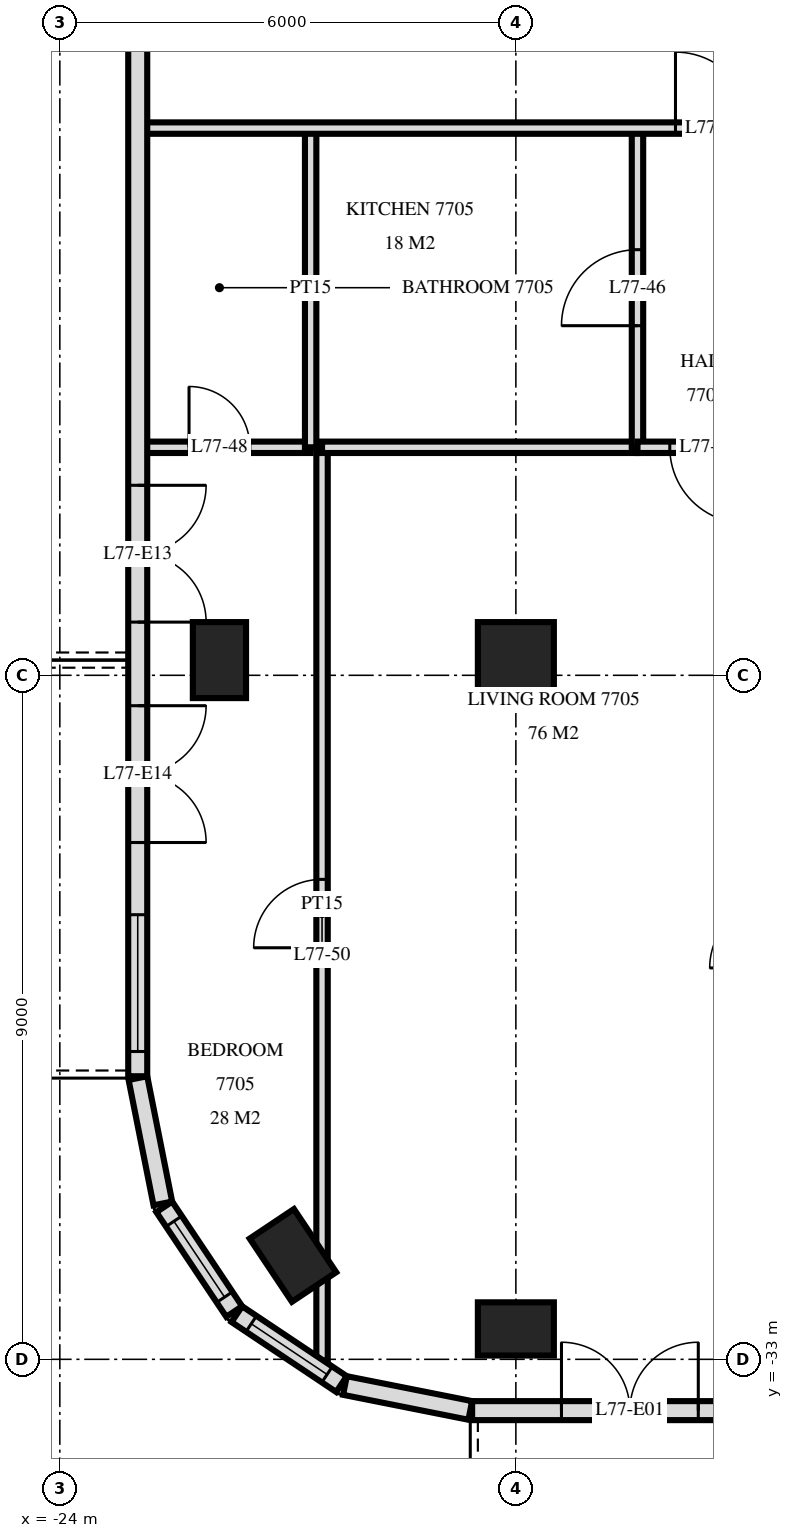
"""IFC4 building model, lengths in metres.
Left out: names, types, materials, properties, quantities, classifications, styles, units other than length and angle.
Written with IfcOpenShell. Run it as: python <this file> out.ifc"""

import sys

from ifc_helpers import new_model, si_unit, direction, frame, frame_2d, origin, origin_2d, place, context, subcontext, project, spatial, rectangle, extrude, element, fill, save


model = new_model("IFC4")
c1 = context("Model", 3, precision=1e-05, world=origin(), true_north=direction((0.0, 1.0)))
c2 = subcontext(c1, "Body", "Model", "MODEL_VIEW")
j1 = project(units=[si_unit("LENGTHUNIT", "METRE"), si_unit("PLANEANGLEUNIT", "RADIAN")], contexts=[c1])
p1 = place(None, origin())
s1 = spatial("IfcSite", under=j1, at=p1, CompositionType="ELEMENT")
p2 = place(p1, origin())
s2 = spatial("IfcBuilding", under=s1, at=p2, CompositionType="ELEMENT")
p3 = place(p2, frame((0.0, 0.0, 291.1)))
s3 = spatial("IfcBuildingStorey", under=s2, at=p3, CompositionType="ELEMENT", Elevation=291.1)
for number, where, z_axis, x_axis in (
    (1, (-21.9, -23.8, 0.0), (0.0, 0.0, 1.0), (0.0, 1.0, 0.0)),
    (2, (-20.933, -31.633, 0.0), (0.0, 0.0, 1.0), (-0.556, 0.831, 0.0)),
    (3, (-18.0, -32.6, 0.0), (0.0, 0.0, 1.0), (1.0, 0.0, 0.0)),
):
    element("IfcColumn", number, at=place(p3, frame(where, z_axis=z_axis, x_axis=x_axis)), inside=s3, PredefinedType="COLUMN", context=c2, shape_type="SweptSolid", body=[
        extrude(rectangle(XDim=1.0, YDim=0.7, at=origin_2d()), origin(), (0.0, 0.0, 1.0), 3.5),
    ])
p4 = place(p3, frame((-18.0, -23.8, 0.0), z_axis=(0.0, 0.0, 1.0), x_axis=(1.0, 0.0, 0.0)))
e4 = element("IfcColumn", 4, at=p4, inside=s3, PredefinedType="COLUMN", context=c2, shape_type="SweptSolid", body=[
    extrude(rectangle(XDim=1.0, YDim=1.0, at=origin_2d()), origin(), (0.0, 0.0, 1.0), 3.5),
])
p5 = place(p3, frame((-22.975, -3.325, 0.0), z_axis=(0.0, 0.0, 1.0), x_axis=(0.0, -1.0, 0.0)))
e5 = element("IfcWall", 5, at=p5, inside=s3, PredefinedType="SOLIDWALL", context=c2, shape_type="SweptSolid", body=[
    extrude(rectangle(XDim=25.951, YDim=0.25, at=frame_2d((12.975, 0.0))), origin(), (0.0, 0.0, 1.0), 3.22),
])
p6 = place(p5, frame((1.475, 0.0, 0.0)))
e6 = element("IfcOpeningElement", 6, at=p6, cuts=e5, PredefinedType="OPENING", context=c2, shape_type="SweptSolid", body=[
    extrude(rectangle(XDim=1.8, YDim=2.4, at=frame_2d((0.9, 1.2))), frame((0.0, 0.135, 0.0), z_axis=(0.0, -1.0, 0.0), x_axis=(1.0, 0.0, 0.0)), (0.0, 0.0, 1.0), 0.27),
])
p7 = place(p5, frame((7.975, 0.0, 0.0)))
e7 = element("IfcOpeningElement", 7, at=p7, cuts=e5, PredefinedType="OPENING", context=c2, shape_type="SweptSolid", body=[
    extrude(rectangle(XDim=1.8, YDim=2.4, at=frame_2d((0.9, 1.2))), frame((0.0, 0.135, 0.0), z_axis=(0.0, -1.0, 0.0), x_axis=(1.0, 0.0, 0.0)), (0.0, 0.0, 1.0), 0.27),
])
p8 = place(p5, frame((18.175, 0.0, 0.0)))
e8 = element("IfcOpeningElement", 8, at=p8, cuts=e5, PredefinedType="OPENING", context=c2, shape_type="SweptSolid", body=[
    extrude(rectangle(XDim=1.8, YDim=2.4, at=frame_2d((0.9, 1.2))), frame((0.0, 0.135, 0.0), z_axis=(0.0, -1.0, 0.0), x_axis=(1.0, 0.0, 0.0)), (0.0, 0.0, 1.0), 0.27),
])
p9 = place(p5, frame((21.075, 0.0, 0.0)))
e9 = element("IfcOpeningElement", 9, at=p9, cuts=e5, PredefinedType="OPENING", context=c2, shape_type="SweptSolid", body=[
    extrude(rectangle(XDim=1.8, YDim=2.4, at=frame_2d((0.9, 1.2))), frame((0.0, 0.135, 0.0), z_axis=(0.0, -1.0, 0.0), x_axis=(1.0, 0.0, 0.0)), (0.0, 0.0, 1.0), 0.27),
])
p10 = place(p5, frame((23.825, 0.0, 0.9)))
e10 = element("IfcOpeningElement", 10, at=p10, cuts=e5, PredefinedType="OPENING", context=c2, shape_type="SweptSolid", body=[
    extrude(rectangle(XDim=1.8, YDim=1.5, at=frame_2d((0.9, 0.75))), frame((0.0, 0.135, 0.0), z_axis=(0.0, -1.0, 0.0), x_axis=(1.0, 0.0, 0.0)), (0.0, 0.0, 1.0), 0.27),
])
p11 = place(p3, frame((-22.973, -29.3, 0.0), z_axis=(0.0, 0.0, 1.0), x_axis=(0.19513878023, -0.980775640221, 0.0)))
e11 = element("IfcWall", 11, at=p11, inside=s3, PredefinedType="SOLIDWALL", context=c2, shape_type="SweptSolid", body=[
    extrude(rectangle(XDim=1.681, YDim=0.25, at=frame_2d((0.841, 0.0))), origin(), (0.0, 0.0, 1.0), 3.22),
])
p12 = place(p3, frame((-22.626, -30.994, 0.0), z_axis=(0.0, 0.0, 1.0), x_axis=(0.55555029066, -0.831482937015, 0.0)))
e12 = element("IfcWall", 12, at=p12, inside=s3, PredefinedType="SOLIDWALL", context=c2, shape_type="SweptSolid", body=[
    extrude(rectangle(XDim=1.656, YDim=0.25, at=frame_2d((0.828, 0.0))), origin(), (0.0, 0.0, 1.0), 3.22),
])
p13 = place(p12, frame((0.228, 0.0, 0.9)))
e13 = element("IfcOpeningElement", 13, at=p13, cuts=e12, PredefinedType="OPENING", context=c2, shape_type="SweptSolid", body=[
    extrude(rectangle(XDim=1.2, YDim=1.5, at=frame_2d((0.6, 0.75))), frame((0.0, 0.135, 0.0), z_axis=(0.0, -1.0, 0.0), x_axis=(1.0, 0.0, 0.0)), (0.0, 0.0, 1.0), 0.27),
])
p14 = place(p3, frame((-21.671, -32.406, 0.0), z_axis=(0.0, 0.0, 1.0), x_axis=(0.831482937015, -0.55555029066, 0.0)))
e14 = element("IfcWall", 14, at=p14, inside=s3, PredefinedType="SOLIDWALL", context=c2, shape_type="SweptSolid", body=[
    extrude(rectangle(XDim=1.656, YDim=0.25, at=frame_2d((0.828, 0.0))), origin(), (0.0, 0.0, 1.0), 3.22),
])
p15 = place(p14, frame((0.228, 0.0, 0.9)))
e15 = element("IfcOpeningElement", 15, at=p15, cuts=e14, PredefinedType="OPENING", context=c2, shape_type="SweptSolid", body=[
    extrude(rectangle(XDim=1.2, YDim=1.5, at=frame_2d((0.6, 0.75))), frame((0.0, 0.135, 0.0), z_axis=(0.0, -1.0, 0.0), x_axis=(1.0, 0.0, 0.0)), (0.0, 0.0, 1.0), 0.27),
])
p16 = place(p3, frame((-20.249, -33.344, 0.0), z_axis=(0.0, 0.0, 1.0), x_axis=(0.980770110232, -0.195166572128, 0.0)))
e16 = element("IfcWall", 16, at=p16, inside=s3, PredefinedType="SOLIDWALL", context=c2, shape_type="SweptSolid", body=[
    extrude(rectangle(XDim=1.681, YDim=0.25, at=frame_2d((0.841, 0.0))), origin(), (0.0, 0.0, 1.0), 3.22),
])
p17 = place(p3, frame((-18.575, -33.675, 0.0), z_axis=(0.0, 0.0, 1.0), x_axis=(1.0, 0.0, 0.0)))
e17 = element("IfcWall", 17, at=p17, inside=s3, PredefinedType="SOLIDWALL", context=c2, shape_type="SweptSolid", body=[
    extrude(rectangle(XDim=37.151, YDim=0.25, at=frame_2d((18.575, 0.0))), origin(), (0.0, 0.0, 1.0), 3.22),
])
p18 = place(p17, frame((1.175, 0.0, 0.0)))
e18 = element("IfcOpeningElement", 18, at=p18, cuts=e17, PredefinedType="OPENING", context=c2, shape_type="SweptSolid", body=[
    extrude(rectangle(XDim=1.8, YDim=2.4, at=frame_2d((0.9, 1.2))), frame((0.0, 0.135, 0.0), z_axis=(0.0, -1.0, 0.0), x_axis=(1.0, 0.0, 0.0)), (0.0, 0.0, 1.0), 0.27),
])
p19 = place(p17, frame((4.4, 0.0, 0.9)))
e19 = element("IfcOpeningElement", 19, at=p19, cuts=e17, PredefinedType="OPENING", context=c2, shape_type="SweptSolid", body=[
    extrude(rectangle(XDim=1.8, YDim=1.5, at=frame_2d((0.9, 0.75))), frame((0.0, 0.135, 0.0), z_axis=(0.0, -1.0, 0.0), x_axis=(1.0, 0.0, 0.0)), (0.0, 0.0, 1.0), 0.27),
])
p20 = place(p17, frame((6.875, 0.0, 0.9)))
e20 = element("IfcOpeningElement", 20, at=p20, cuts=e17, PredefinedType="OPENING", context=c2, shape_type="SweptSolid", body=[
    extrude(rectangle(XDim=2.4, YDim=1.5, at=frame_2d((1.2, 0.75))), frame((0.0, 0.135, 0.0), z_axis=(0.0, -1.0, 0.0), x_axis=(1.0, 0.0, 0.0)), (0.0, 0.0, 1.0), 0.27),
])
p21 = place(p17, frame((10.175, 0.0, 0.0)))
e21 = element("IfcOpeningElement", 21, at=p21, cuts=e17, PredefinedType="OPENING", context=c2, shape_type="SweptSolid", body=[
    extrude(rectangle(XDim=1.8, YDim=2.4, at=frame_2d((0.9, 1.2))), frame((0.0, 0.135, 0.0), z_axis=(0.0, -1.0, 0.0), x_axis=(1.0, 0.0, 0.0)), (0.0, 0.0, 1.0), 0.27),
])
p22 = place(p17, frame((13.175, 0.0, 0.0)))
e22 = element("IfcOpeningElement", 22, at=p22, cuts=e17, PredefinedType="OPENING", context=c2, shape_type="SweptSolid", body=[
    extrude(rectangle(XDim=1.8, YDim=2.4, at=frame_2d((0.9, 1.2))), frame((0.0, 0.135, 0.0), z_axis=(0.0, -1.0, 0.0), x_axis=(1.0, 0.0, 0.0)), (0.0, 0.0, 1.0), 0.27),
])
p23 = place(p17, frame((15.875, 0.0, 0.9)))
e23 = element("IfcOpeningElement", 23, at=p23, cuts=e17, PredefinedType="OPENING", context=c2, shape_type="SweptSolid", body=[
    extrude(rectangle(XDim=2.4, YDim=1.5, at=frame_2d((1.2, 0.75))), frame((0.0, 0.135, 0.0), z_axis=(0.0, -1.0, 0.0), x_axis=(1.0, 0.0, 0.0)), (0.0, 0.0, 1.0), 0.27),
])
p24 = place(p17, frame((19.175, 0.0, 0.0)))
e24 = element("IfcOpeningElement", 24, at=p24, cuts=e17, PredefinedType="OPENING", context=c2, shape_type="SweptSolid", body=[
    extrude(rectangle(XDim=1.8, YDim=2.4, at=frame_2d((0.9, 1.2))), frame((0.0, 0.135, 0.0), z_axis=(0.0, -1.0, 0.0), x_axis=(1.0, 0.0, 0.0)), (0.0, 0.0, 1.0), 0.27),
])
p25 = place(p17, frame((21.875, 0.0, 0.9)))
e25 = element("IfcOpeningElement", 25, at=p25, cuts=e17, PredefinedType="OPENING", context=c2, shape_type="SweptSolid", body=[
    extrude(rectangle(XDim=2.4, YDim=1.5, at=frame_2d((1.2, 0.75))), frame((0.0, 0.135, 0.0), z_axis=(0.0, -1.0, 0.0), x_axis=(1.0, 0.0, 0.0)), (0.0, 0.0, 1.0), 0.27),
])
p26 = place(p17, frame((25.063, 0.0, 0.9)))
e26 = element("IfcOpeningElement", 26, at=p26, cuts=e17, PredefinedType="OPENING", context=c2, shape_type="SweptSolid", body=[
    extrude(rectangle(XDim=1.8, YDim=1.5, at=frame_2d((0.9, 0.75))), frame((0.0, 0.135, 0.0), z_axis=(0.0, -1.0, 0.0), x_axis=(1.0, 0.0, 0.0)), (0.0, 0.0, 1.0), 0.27),
])
p27 = place(p17, frame((27.838, 0.0, 0.0)))
e27 = element("IfcOpeningElement", 27, at=p27, cuts=e17, PredefinedType="OPENING", context=c2, shape_type="SweptSolid", body=[
    extrude(rectangle(XDim=1.8, YDim=2.4, at=frame_2d((0.9, 1.2))), frame((0.0, 0.135, 0.0), z_axis=(0.0, -1.0, 0.0), x_axis=(1.0, 0.0, 0.0)), (0.0, 0.0, 1.0), 0.27),
])
p28 = place(p17, frame((31.175, 0.0, 0.0)))
e28 = element("IfcOpeningElement", 28, at=p28, cuts=e17, PredefinedType="OPENING", context=c2, shape_type="SweptSolid", body=[
    extrude(rectangle(XDim=1.8, YDim=2.4, at=frame_2d((0.9, 1.2))), frame((0.0, 0.135, 0.0), z_axis=(0.0, -1.0, 0.0), x_axis=(1.0, 0.0, 0.0)), (0.0, 0.0, 1.0), 0.27),
])
p29 = place(p3, frame((-16.4, -21.0, 0.0), z_axis=(0.0, 0.0, 1.0), x_axis=(0.0, 1.0, 0.0)))
e29 = element("IfcWall", 29, at=p29, inside=s3, PredefinedType="PARTITIONING", context=c2, shape_type="SweptSolid", body=[
    extrude(rectangle(XDim=4.2, YDim=0.15, at=frame_2d((2.1, 0.0))), origin(), (0.0, 0.0, 1.0), 3.22),
])
p30 = place(p29, frame((1.6, 0.0, 0.0)))
e30 = element("IfcOpeningElement", 30, at=p30, cuts=e29, PredefinedType="OPENING", context=c2, shape_type="SweptSolid", body=[
    extrude(rectangle(XDim=1.0, YDim=2.1, at=frame_2d((0.5, 1.05))), frame((0.0, 0.085, 0.0), z_axis=(0.0, -1.0, 0.0), x_axis=(1.0, 0.0, 0.0)), (0.0, 0.0, 1.0), 0.17),
])
p31 = place(p3, frame((-20.55, -33.017, 0.0), z_axis=(0.0, 0.0, 1.0), x_axis=(0.0, 1.0, 0.0)))
e31 = element("IfcWall", 31, at=p31, inside=s3, PredefinedType="PARTITIONING", context=c2, shape_type="SweptSolid", body=[
    extrude(rectangle(XDim=12.017, YDim=0.15, at=frame_2d((6.008, 0.0))), origin(), (0.0, 0.0, 1.0), 3.22),
])
p32 = place(p31, frame((5.432, 0.0, 0.0)))
e32 = element("IfcOpeningElement", 32, at=p32, cuts=e31, PredefinedType="OPENING", context=c2, shape_type="SweptSolid", body=[
    extrude(rectangle(XDim=0.9, YDim=2.1, at=frame_2d((0.45, 1.05))), frame((0.0, 0.085, 0.0), z_axis=(0.0, -1.0, 0.0), x_axis=(1.0, 0.0, 0.0)), (0.0, 0.0, 1.0), 0.17),
])
p33 = place(p3, frame((-20.7, -21.0, 0.0), z_axis=(0.0, 0.0, 1.0), x_axis=(0.0, 1.0, 0.0)))
e33 = element("IfcWall", 33, at=p33, inside=s3, PredefinedType="PARTITIONING", context=c2, shape_type="SweptSolid", body=[
    extrude(rectangle(XDim=4.2, YDim=0.15, at=frame_2d((2.1, 0.0))), origin(), (0.0, 0.0, 1.0), 3.22),
])
p34 = place(p3, frame((-16.4, -21.0, 0.0), z_axis=(0.0, 0.0, 1.0), x_axis=(1.0, 0.0, 0.0)))
e34 = element("IfcWall", 34, at=p34, inside=s3, PredefinedType="PARTITIONING", context=c2, shape_type="SweptSolid", body=[
    extrude(rectangle(XDim=1.85, YDim=0.15, at=frame_2d((0.925, 0.0))), origin(), (0.0, 0.0, 1.0), 3.22),
])
p35 = place(p34, frame((0.425, 0.0, 0.0)))
e35 = element("IfcOpeningElement", 35, at=p35, cuts=e34, PredefinedType="OPENING", context=c2, shape_type="SweptSolid", body=[
    extrude(rectangle(XDim=1.0, YDim=2.1, at=frame_2d((0.5, 1.05))), frame((0.0, 0.085, 0.0), z_axis=(0.0, -1.0, 0.0), x_axis=(1.0, 0.0, 0.0)), (0.0, 0.0, 1.0), 0.17),
])
p36 = place(p3, frame((-22.92, -21.0, 0.0), z_axis=(0.0, 0.0, 1.0), x_axis=(1.0, 0.0, 0.0)))
e36 = element("IfcWall", 36, at=p36, inside=s3, PredefinedType="PARTITIONING", context=c2, shape_type="SweptSolid", body=[
    extrude(rectangle(XDim=2.22, YDim=0.15, at=frame_2d((1.11, 0.0))), origin(), (0.0, 0.0, 1.0), 3.22),
])
p37 = place(p36, frame((0.62, 0.0, 0.0)))
e37 = element("IfcOpeningElement", 37, at=p37, cuts=e36, PredefinedType="OPENING", context=c2, shape_type="SweptSolid", body=[
    extrude(rectangle(XDim=0.8, YDim=2.1, at=frame_2d((0.4, 1.05))), frame((0.0, 0.085, 0.0), z_axis=(0.0, -1.0, 0.0), x_axis=(1.0, 0.0, 0.0)), (0.0, 0.0, 1.0), 0.17),
])
p38 = place(p3, frame((-20.55, -21.0, 0.0), z_axis=(0.0, 0.0, 1.0), x_axis=(1.0, 0.0, 0.0)))
e38 = element("IfcWall", 38, at=p38, inside=s3, PredefinedType="PARTITIONING", context=c2, shape_type="SweptSolid", body=[
    extrude(rectangle(XDim=4.15, YDim=0.15, at=frame_2d((2.075, 0.0))), origin(), (0.0, 0.0, 1.0), 3.22),
])
p39 = place(p3, frame((-22.92, -16.8, 0.0), z_axis=(0.0, 0.0, 1.0), x_axis=(1.0, 0.0, 0.0)))
e39 = element("IfcWall", 39, at=p39, inside=s3, PredefinedType="PARTITIONING", context=c2, shape_type="SweptSolid", body=[
    extrude(rectangle(XDim=45.84, YDim=0.15, at=frame_2d((22.92, 0.0))), origin(), (0.0, 0.0, 1.0), 3.22),
])
p40 = place(p39, frame((16.72, 0.0, 0.0)))
e40 = element("IfcOpeningElement", 40, at=p40, cuts=e39, PredefinedType="OPENING", context=c2, shape_type="SweptSolid", body=[
    extrude(rectangle(XDim=1.0, YDim=2.1, at=frame_2d((0.5, 1.05))), frame((0.0, 0.085, 0.0), z_axis=(0.0, -1.0, 0.0), x_axis=(1.0, 0.0, 0.0)), (0.0, 0.0, 1.0), 0.17),
])
p41 = place(p39, frame((18.52, 0.0, 0.0)))
e41 = element("IfcOpeningElement", 41, at=p41, cuts=e39, PredefinedType="OPENING", context=c2, shape_type="SweptSolid", body=[
    extrude(rectangle(XDim=1.0, YDim=2.1, at=frame_2d((0.5, 1.05))), frame((0.0, 0.085, 0.0), z_axis=(0.0, -1.0, 0.0), x_axis=(1.0, 0.0, 0.0)), (0.0, 0.0, 1.0), 0.17),
])
p42 = place(p39, frame((21.77, 0.0, 0.0)))
e42 = element("IfcOpeningElement", 42, at=p42, cuts=e39, PredefinedType="OPENING", context=c2, shape_type="SweptSolid", body=[
    extrude(rectangle(XDim=1.0, YDim=2.1, at=frame_2d((0.5, 1.05))), frame((0.0, 0.085, 0.0), z_axis=(0.0, -1.0, 0.0), x_axis=(1.0, 0.0, 0.0)), (0.0, 0.0, 1.0), 0.17),
])
p43 = place(p39, frame((23.07, 0.0, 0.0)))
e43 = element("IfcOpeningElement", 43, at=p43, cuts=e39, PredefinedType="OPENING", context=c2, shape_type="SweptSolid", body=[
    extrude(rectangle(XDim=1.0, YDim=2.1, at=frame_2d((0.5, 1.05))), frame((0.0, 0.085, 0.0), z_axis=(0.0, -1.0, 0.0), x_axis=(1.0, 0.0, 0.0)), (0.0, 0.0, 1.0), 0.17),
])
p44 = place(p39, frame((27.77, 0.0, 0.0)))
e44 = element("IfcOpeningElement", 44, at=p44, cuts=e39, PredefinedType="OPENING", context=c2, shape_type="SweptSolid", body=[
    extrude(rectangle(XDim=1.0, YDim=2.1, at=frame_2d((0.5, 1.05))), frame((0.0, 0.085, 0.0), z_axis=(0.0, -1.0, 0.0), x_axis=(1.0, 0.0, 0.0)), (0.0, 0.0, 1.0), 0.17),
])
p45 = place(p39, frame((7.02, 0.0, 0.0)))
e45 = element("IfcOpeningElement", 45, at=p45, cuts=e39, PredefinedType="OPENING", context=c2, shape_type="SweptSolid", body=[
    extrude(rectangle(XDim=1.0, YDim=2.1, at=frame_2d((0.5, 1.05))), frame((0.0, 0.085, 0.0), z_axis=(0.0, -1.0, 0.0), x_axis=(1.0, 0.0, 0.0)), (0.0, 0.0, 1.0), 0.17),
])
p46 = place(p39, frame((35.42, 0.0, 0.0)))
e46 = element("IfcOpeningElement", 46, at=p46, cuts=e39, PredefinedType="OPENING", context=c2, shape_type="SweptSolid", body=[
    extrude(rectangle(XDim=1.0, YDim=2.1, at=frame_2d((0.5, 1.05))), frame((0.0, 0.085, 0.0), z_axis=(0.0, -1.0, 0.0), x_axis=(1.0, 0.0, 0.0)), (0.0, 0.0, 1.0), 0.17),
])
p47 = place(p39, frame((42.19, 0.0, 0.0)))
e47 = element("IfcOpeningElement", 47, at=p47, cuts=e39, PredefinedType="OPENING", context=c2, shape_type="SweptSolid", body=[
    extrude(rectangle(XDim=1.0, YDim=2.1, at=frame_2d((0.5, 1.05))), frame((0.0, 0.085, 0.0), z_axis=(0.0, -1.0, 0.0), x_axis=(1.0, 0.0, 0.0)), (0.0, 0.0, 1.0), 0.17),
])
p48 = place(p13, origin())
e48 = element("IfcWindow", 48, at=p48, inside=s3, PartitioningType="SINGLE_PANEL", PredefinedType="WINDOW", context=c2, shape_type="SweptSolid", body=[
    extrude(rectangle(XDim=1.2, YDim=1.5, at=frame_2d((0.6, 0.75))), frame((0.0, 0.03, 0.0), z_axis=(0.0, -1.0, 0.0), x_axis=(1.0, 0.0, 0.0)), (0.0, 0.0, 1.0), 0.06),
])
fill(e13, e48)
p49 = place(p15, origin())
e49 = element("IfcWindow", 49, at=p49, inside=s3, PartitioningType="SINGLE_PANEL", PredefinedType="WINDOW", context=c2, shape_type="SweptSolid", body=[
    extrude(rectangle(XDim=1.2, YDim=1.5, at=frame_2d((0.6, 0.75))), frame((0.0, 0.03, 0.0), z_axis=(0.0, -1.0, 0.0), x_axis=(1.0, 0.0, 0.0)), (0.0, 0.0, 1.0), 0.06),
])
fill(e15, e49)
p50 = place(p18, origin())
e50 = element("IfcDoor", 50, at=p50, inside=s3, OperationType="DOUBLE_DOOR_SINGLE_SWING", PredefinedType="DOOR", context=c2, shape_type="SweptSolid", body=[
    extrude(rectangle(XDim=1.8, YDim=2.4, at=frame_2d((0.9, 1.2))), frame((0.0, 0.025, 0.0), z_axis=(0.0, -1.0, 0.0), x_axis=(1.0, 0.0, 0.0)), (0.0, 0.0, 1.0), 0.05),
])
fill(e18, e50)
p51 = place(p8, origin())
e51 = element("IfcDoor", 51, at=p51, inside=s3, OperationType="DOUBLE_DOOR_SINGLE_SWING", PredefinedType="DOOR", context=c2, shape_type="SweptSolid", body=[
    extrude(rectangle(XDim=1.8, YDim=2.4, at=frame_2d((0.9, 1.2))), frame((0.0, 0.025, 0.0), z_axis=(0.0, -1.0, 0.0), x_axis=(1.0, 0.0, 0.0)), (0.0, 0.0, 1.0), 0.05),
])
fill(e8, e51)
p52 = place(p9, origin())
e52 = element("IfcDoor", 52, at=p52, inside=s3, OperationType="DOUBLE_DOOR_SINGLE_SWING", PredefinedType="DOOR", context=c2, shape_type="SweptSolid", body=[
    extrude(rectangle(XDim=1.8, YDim=2.4, at=frame_2d((0.9, 1.2))), frame((0.0, 0.025, 0.0), z_axis=(0.0, -1.0, 0.0), x_axis=(1.0, 0.0, 0.0)), (0.0, 0.0, 1.0), 0.05),
])
fill(e9, e52)
p53 = place(p10, origin())
e53 = element("IfcWindow", 53, at=p53, inside=s3, PartitioningType="SINGLE_PANEL", PredefinedType="WINDOW", context=c2, shape_type="SweptSolid", body=[
    extrude(rectangle(XDim=1.8, YDim=1.5, at=frame_2d((0.9, 0.75))), frame((0.0, 0.03, 0.0), z_axis=(0.0, -1.0, 0.0), x_axis=(1.0, 0.0, 0.0)), (0.0, 0.0, 1.0), 0.06),
])
fill(e10, e53)
p54 = place(p45, origin())
e54 = element("IfcDoor", 54, at=p54, inside=s3, OperationType="SINGLE_SWING_RIGHT", PredefinedType="DOOR", context=c2, shape_type="SweptSolid", body=[
    extrude(rectangle(XDim=1.0, YDim=2.1, at=frame_2d((0.5, 1.05))), frame((0.0, 0.025, 0.0), z_axis=(0.0, -1.0, 0.0), x_axis=(1.0, 0.0, 0.0)), (0.0, 0.0, 1.0), 0.05),
])
fill(e45, e54)
p55 = place(p30, origin())
e55 = element("IfcDoor", 55, at=p55, inside=s3, OperationType="SINGLE_SWING_RIGHT", PredefinedType="DOOR", context=c2, shape_type="SweptSolid", body=[
    extrude(rectangle(XDim=1.0, YDim=2.1, at=frame_2d((0.5, 1.05))), frame((0.0, 0.025, 0.0), z_axis=(0.0, -1.0, 0.0), x_axis=(1.0, 0.0, 0.0)), (0.0, 0.0, 1.0), 0.05),
])
fill(e30, e55)
p56 = place(p35, frame((0.5, 0.0, 0.0), z_axis=(0.0, 0.0, 1.0), x_axis=(-1.0, 0.0, 0.0)))
e56 = element("IfcDoor", 56, at=p56, inside=s3, OperationType="SINGLE_SWING_RIGHT", PredefinedType="DOOR", context=c2, shape_type="SweptSolid", body=[
    extrude(rectangle(XDim=1.0, YDim=2.1, at=frame_2d((0.0, 1.05))), frame((0.0, -0.025, 0.0), z_axis=(0.0, 1.0, 0.0), x_axis=(-1.0, 0.0, 0.0)), (0.0, 0.0, 1.0), 0.05),
])
fill(e35, e56)
p57 = place(p37, origin())
e57 = element("IfcDoor", 57, at=p57, inside=s3, OperationType="SINGLE_SWING_RIGHT", PredefinedType="DOOR", context=c2, shape_type="SweptSolid", body=[
    extrude(rectangle(XDim=0.8, YDim=2.1, at=frame_2d((0.4, 1.05))), frame((0.0, 0.025, 0.0), z_axis=(0.0, -1.0, 0.0), x_axis=(1.0, 0.0, 0.0)), (0.0, 0.0, 1.0), 0.05),
])
fill(e37, e57)
p58 = place(p32, origin())
e58 = element("IfcDoor", 58, at=p58, inside=s3, OperationType="SINGLE_SWING_RIGHT", PredefinedType="DOOR", context=c2, shape_type="SweptSolid", body=[
    extrude(rectangle(XDim=0.9, YDim=2.1, at=frame_2d((0.45, 1.05))), frame((0.0, 0.025, 0.0), z_axis=(0.0, -1.0, 0.0), x_axis=(1.0, 0.0, 0.0)), (0.0, 0.0, 1.0), 0.05),
])
fill(e32, e58)
save(model, sys.argv[1])
